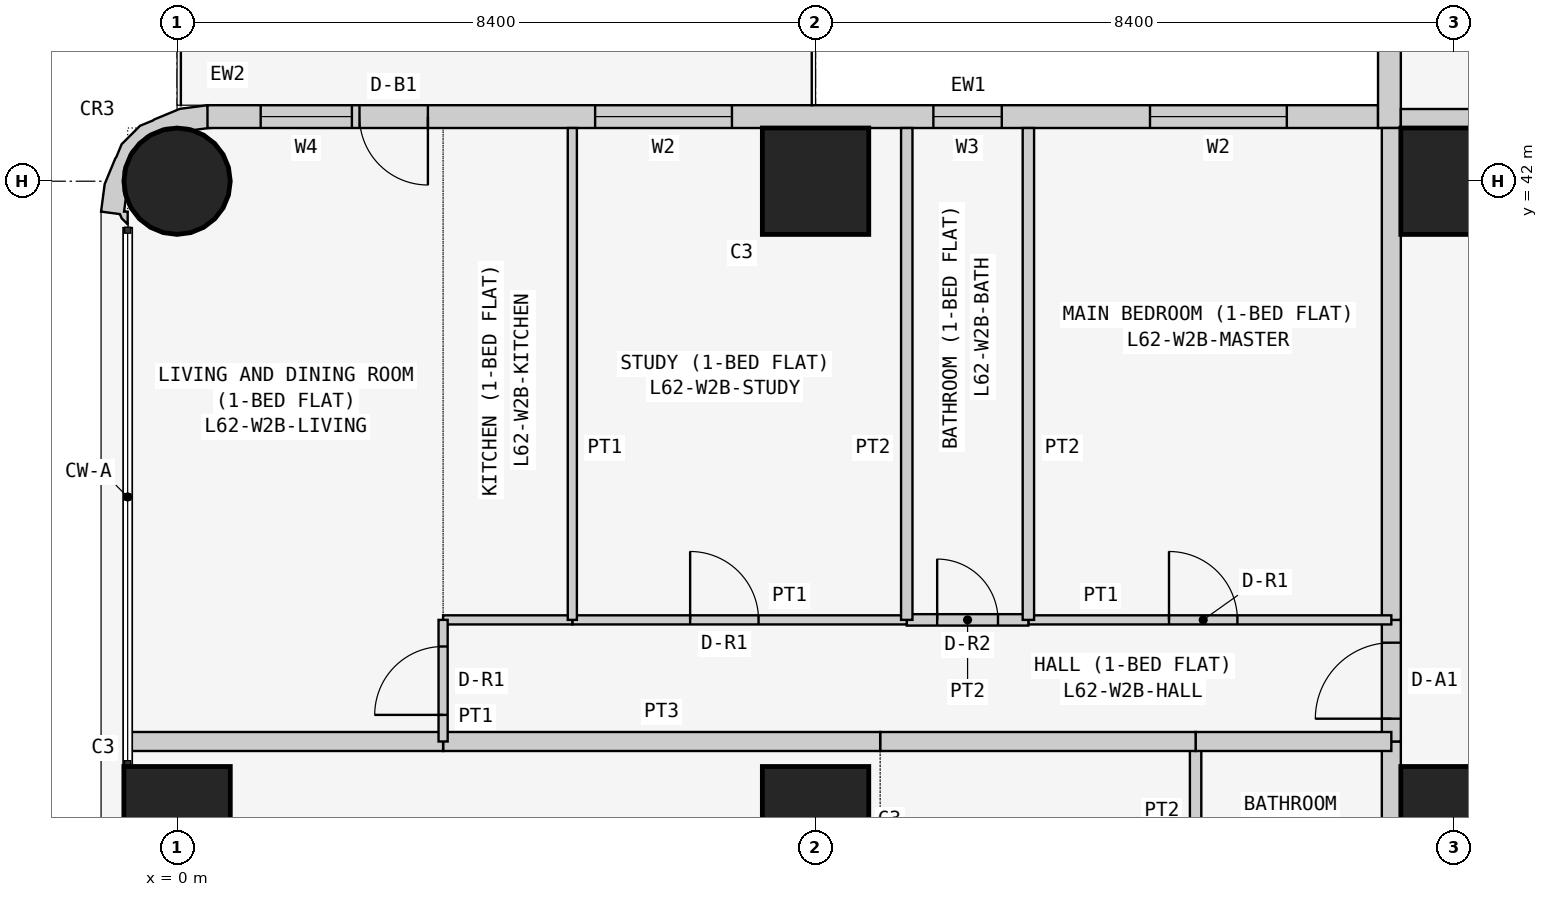
"""IFC4 building model, lengths in metres.
Left out: names, types, materials, properties, quantities, classifications, styles, units other than length and angle.
Written with IfcOpenShell. Run it as: python <this file> out.ifc"""

import sys

from ifc_helpers import new_model, si_unit, direction, frame, frame_2d, origin, origin_2d, place, context, subcontext, project, spatial, polyline, rectangle, circle, outline, extrude, element, fill, save


model = new_model("IFC4")
c1 = context("Model", 3, precision=1e-05, world=origin(), true_north=direction((0.0, 1.0)))
c2 = subcontext(c1, "Body", "Model", "MODEL_VIEW")
j1 = project(units=[si_unit("LENGTHUNIT", "METRE"), si_unit("PLANEANGLEUNIT", "RADIAN")], contexts=[c1])
p1 = place(None, origin())
s1 = spatial("IfcSite", under=j1, at=p1, CompositionType="ELEMENT")
p2 = place(p1, origin())
s2 = spatial("IfcBuilding", under=s1, at=p2, CompositionType="ELEMENT")
p3 = place(p2, frame((0.0, 0.0, 237.3)))
s3 = spatial("IfcBuildingStorey", under=s2, at=p3, CompositionType="ELEMENT", Elevation=237.3)
p4 = place(p3, frame((0.0, 33.6, 0.0), z_axis=(0.0, 0.0, 1.0), x_axis=(1.0, 0.0, 0.0)))
e1 = element("IfcColumn", 1, at=p4, inside=s3, PredefinedType="COLUMN", context=c2, shape_type="SweptSolid", body=[
    extrude(rectangle(XDim=1.4, YDim=1.4, at=origin_2d()), origin(), (0.0, 0.0, 1.0), 3.6),
])
p5 = place(p3, frame((0.0, 42.0, 0.0), z_axis=(0.0, 0.0, 1.0), x_axis=(1.0, 0.0, 0.0)))
e2 = element("IfcColumn", 2, at=p5, inside=s3, PredefinedType="COLUMN", context=c2, shape_type="SweptSolid", body=[
    extrude(circle(Radius=0.7, at=origin_2d()), origin(), (0.0, 0.0, 1.0), 3.6),
])
for number, where, z_axis, x_axis in (
    (3, (8.4, 33.6, 0.0), (0.0, 0.0, 1.0), (1.0, 0.0, 0.0)),
    (4, (8.4, 42.0, 0.0), (0.0, 0.0, 1.0), (1.0, 0.0, 0.0)),
    (5, (16.8, 33.6, 0.0), (0.0, 0.0, 1.0), (1.0, 0.0, 0.0)),
    (6, (16.8, 42.0, 0.0), (0.0, 0.0, 1.0), (1.0, 0.0, 0.0)),
):
    element("IfcColumn", number, at=place(p3, frame(where, z_axis=z_axis, x_axis=x_axis)), inside=s3, PredefinedType="COLUMN", context=c2, shape_type="SweptSolid", body=[
        extrude(rectangle(XDim=1.4, YDim=1.4, at=origin_2d()), origin(), (0.0, 0.0, 1.0), 3.6),
    ])
p6 = place(p3, frame((15.8, 42.85, 0.0), z_axis=(0.0, 0.0, 1.0), x_axis=(-1.0, 0.0, 0.0)))
e7 = element("IfcWall", 7, at=p6, inside=s3, PredefinedType="SOLIDWALL", context=c2, shape_type="SweptSolid", body=[
    extrude(rectangle(XDim=15.4, YDim=0.3, at=frame_2d((7.7, 0.0))), origin(), (0.0, 0.0, 1.0), 3.45),
])
p7 = place(p6, frame((1.2, 0.0, 0.9)))
e8 = element("IfcOpeningElement", 8, at=p7, cuts=e7, PredefinedType="OPENING", context=c2, shape_type="SweptSolid", body=[
    extrude(rectangle(XDim=1.8, YDim=1.5, at=frame_2d((0.9, 0.75))), frame((0.0, 0.16, 0.0), z_axis=(0.0, -1.0, 0.0), x_axis=(1.0, 0.0, 0.0)), (0.0, 0.0, 1.0), 0.32),
])
p8 = place(p6, frame((4.95, 0.0, 1.5)))
e9 = element("IfcOpeningElement", 9, at=p8, cuts=e7, PredefinedType="OPENING", context=c2, shape_type="SweptSolid", body=[
    extrude(rectangle(XDim=0.9, YDim=0.7, at=frame_2d((0.45, 0.35))), frame((0.0, 0.16, 0.0), z_axis=(0.0, -1.0, 0.0), x_axis=(1.0, 0.0, 0.0)), (0.0, 0.0, 1.0), 0.32),
])
p9 = place(p6, frame((8.5, 0.0, 0.9)))
e10 = element("IfcOpeningElement", 10, at=p9, cuts=e7, PredefinedType="OPENING", context=c2, shape_type="SweptSolid", body=[
    extrude(rectangle(XDim=1.8, YDim=1.5, at=frame_2d((0.9, 0.75))), frame((0.0, 0.16, 0.0), z_axis=(0.0, -1.0, 0.0), x_axis=(1.0, 0.0, 0.0)), (0.0, 0.0, 1.0), 0.32),
])
p10 = place(p6, frame((12.5, 0.0, 0.0)))
e11 = element("IfcOpeningElement", 11, at=p10, cuts=e7, PredefinedType="OPENING", context=c2, shape_type="SweptSolid", body=[
    extrude(rectangle(XDim=0.9, YDim=2.4, at=frame_2d((0.45, 1.2))), frame((0.0, 0.16, 0.0), z_axis=(0.0, -1.0, 0.0), x_axis=(1.0, 0.0, 0.0)), (0.0, 0.0, 1.0), 0.32),
])
p11 = place(p6, frame((13.5, 0.0, 0.9)))
e12 = element("IfcOpeningElement", 12, at=p11, cuts=e7, PredefinedType="OPENING", context=c2, shape_type="SweptSolid", body=[
    extrude(rectangle(XDim=1.2, YDim=1.5, at=frame_2d((0.6, 0.75))), frame((0.0, 0.16, 0.0), z_axis=(0.0, -1.0, 0.0), x_axis=(1.0, 0.0, 0.0)), (0.0, 0.0, 1.0), 0.32),
])
p12 = place(p3, frame((15.95, 50.0, 0.0), z_axis=(0.0, 0.0, 1.0), x_axis=(0.0, -1.0, 0.0)))
e13 = element("IfcWall", 13, at=p12, inside=s3, PredefinedType="SOLIDWALL", context=c2, shape_type="SweptSolid", body=[
    extrude(rectangle(XDim=7.3, YDim=0.3, at=frame_2d((3.65, 0.0))), origin(), (0.0, 0.0, 1.0), 3.45),
])
p13 = place(p12, frame((3.1, 0.0, 0.9)))
e14 = element("IfcOpeningElement", 14, at=p13, cuts=e13, PredefinedType="OPENING", context=c2, shape_type="SweptSolid", body=[
    extrude(rectangle(XDim=2.4, YDim=1.5, at=frame_2d((1.2, 0.75))), frame((0.0, 0.16, 0.0), z_axis=(0.0, -1.0, 0.0), x_axis=(1.0, 0.0, 0.0)), (0.0, 0.0, 1.0), 0.32),
])
p14 = place(p12, frame((0.75, 0.0, 0.9)))
e15 = element("IfcOpeningElement", 15, at=p14, cuts=e13, PredefinedType="OPENING", context=c2, shape_type="SweptSolid", body=[
    extrude(rectangle(XDim=1.2, YDim=1.5, at=frame_2d((0.6, 0.75))), frame((0.0, 0.16, 0.0), z_axis=(0.0, -1.0, 0.0), x_axis=(1.0, 0.0, 0.0)), (0.0, 0.0, 1.0), 0.32),
])
p15 = place(p3, frame((0.29, 42.724, 0.0), z_axis=(0.0, 0.0, 1.0), x_axis=(-0.898030234854, 0.439933741929, 0.0)))
e16 = element("IfcWall", 16, at=p15, inside=s3, PredefinedType="SOLIDWALL", context=c2, shape_type="SweptSolid", body=[
    extrude(outline(polyline([(-0.145, -0.044), (0.022, -0.296), (0.327, -0.094), (0.568, 0.18), (0.578, 0.199), (0.7, 0.338), (0.811, 0.661), (0.799, 0.846), (0.803, 0.866), (0.78, 1.231), (0.664, 1.577), (0.426, 1.497), (0.382, 1.536), (0.276, 1.572), (0.349, 1.423), (0.392, 1.444), (0.453, 1.261), (0.51, 1.211), (0.632, 0.961), (0.65, 0.683), (0.56, 0.419), (0.375, 0.21), (0.125, 0.087), (0.05, 0.082), (-0.127, -0.035), (-0.145, -0.044)])), origin(), (0.0, 0.0, 1.0), 3.45),
])
p16 = place(p3, frame((16.1, 42.825, 0.0), z_axis=(0.0, 0.0, 1.0), x_axis=(1.0, 0.0, 0.0)))
e17 = element("IfcWall", 17, at=p16, inside=s3, PredefinedType="PARTITIONING", context=c2, shape_type="SweptSolid", body=[
    extrude(rectangle(XDim=6.871, YDim=0.25, at=frame_2d((3.436, 0.0))), origin(), (0.0, 0.0, 1.0), 3.45),
])
p17 = place(p3, frame((15.975, 32.0, 0.0), z_axis=(0.0, 0.0, 1.0), x_axis=(0.0, 1.0, 0.0)))
e18 = element("IfcWall", 18, at=p17, inside=s3, PredefinedType="PARTITIONING", context=c2, shape_type="SweptSolid", body=[
    extrude(rectangle(XDim=2.629, YDim=0.25, at=frame_2d((1.314, 0.0))), origin(), (0.0, 0.0, 1.0), 3.45),
])
p18 = place(p3, frame((15.975, 34.629, 0.0), z_axis=(0.0, 0.0, 1.0), x_axis=(0.0, 1.0, 0.0)))
e19 = element("IfcWall", 19, at=p18, inside=s3, PredefinedType="PARTITIONING", context=c2, shape_type="SweptSolid", body=[
    extrude(rectangle(XDim=1.6, YDim=0.25, at=frame_2d((0.8, 0.0))), origin(), (0.0, 0.0, 1.0), 3.45),
])
p19 = place(p18, frame((0.3, 0.0, 0.0)))
e20 = element("IfcOpeningElement", 20, at=p19, cuts=e19, PredefinedType="OPENING", context=c2, shape_type="SweptSolid", body=[
    extrude(rectangle(XDim=1.0, YDim=2.1, at=frame_2d((0.5, 1.05))), frame((0.0, 0.135, 0.0), z_axis=(0.0, -1.0, 0.0), x_axis=(1.0, 0.0, 0.0)), (0.0, 0.0, 1.0), 0.27),
])
p20 = place(p3, frame((15.975, 36.229, 0.0), z_axis=(0.0, 0.0, 1.0), x_axis=(0.0, 1.0, 0.0)))
e21 = element("IfcWall", 21, at=p20, inside=s3, PredefinedType="PARTITIONING", context=c2, shape_type="SweptSolid", body=[
    extrude(rectangle(XDim=6.471, YDim=0.25, at=frame_2d((3.235, 0.0))), origin(), (0.0, 0.0, 1.0), 3.45),
])
p21 = place(p3, frame((13.4, 32.0, 0.0), z_axis=(0.0, 0.0, 1.0), x_axis=(0.0, 1.0, 0.0)))
e22 = element("IfcWall", 22, at=p21, inside=s3, PredefinedType="PARTITIONING", context=c2, shape_type="SweptSolid", body=[
    extrude(rectangle(XDim=2.629, YDim=0.15, at=frame_2d((1.314, 0.0))), origin(), (0.0, 0.0, 1.0), 3.45),
])
p22 = place(p3, frame((13.4, 34.629, 0.0), z_axis=(0.0, 0.0, 1.0), x_axis=(1.0, 0.0, 0.0)))
e23 = element("IfcWall", 23, at=p22, inside=s3, PredefinedType="PARTITIONING", context=c2, shape_type="SweptSolid", body=[
    extrude(rectangle(XDim=2.575, YDim=0.25, at=frame_2d((1.288, 0.0))), origin(), (0.0, 0.0, 1.0), 3.45),
])
p23 = place(p3, frame((9.25, 34.629, 0.0), z_axis=(0.0, 0.0, 1.0), x_axis=(1.0, 0.0, 0.0)))
e24 = element("IfcWall", 24, at=p23, inside=s3, PredefinedType="PARTITIONING", context=c2, shape_type="SweptSolid", body=[
    extrude(rectangle(XDim=4.15, YDim=0.25, at=frame_2d((2.075, 0.0))), origin(), (0.0, 0.0, 1.0), 3.45),
])
p24 = place(p3, frame((3.5, 34.629, 0.0), z_axis=(0.0, 0.0, 1.0), x_axis=(1.0, 0.0, 0.0)))
e25 = element("IfcWall", 25, at=p24, inside=s3, PredefinedType="PARTITIONING", context=c2, shape_type="SweptSolid", body=[
    extrude(rectangle(XDim=5.75, YDim=0.25, at=frame_2d((2.875, 0.0))), origin(), (0.0, 0.0, 1.0), 3.45),
])
p25 = place(p3, frame((-0.65, 34.629, 0.0), z_axis=(0.0, 0.0, 1.0), x_axis=(1.0, 0.0, 0.0)))
e26 = element("IfcWall", 26, at=p25, inside=s3, PredefinedType="PARTITIONING", context=c2, shape_type="SweptSolid", body=[
    extrude(rectangle(XDim=4.15, YDim=0.25, at=frame_2d((2.075, 0.0))), origin(), (0.0, 0.0, 1.0), 3.45),
])
p26 = place(p3, frame((11.2, 36.229, 0.0), z_axis=(0.0, 0.0, 1.0), x_axis=(1.0, 0.0, 0.0)))
e27 = element("IfcWall", 27, at=p26, inside=s3, PredefinedType="PARTITIONING", context=c2, shape_type="SweptSolid", body=[
    extrude(rectangle(XDim=4.775, YDim=0.12, at=frame_2d((2.388, 0.0))), origin(), (0.0, 0.0, 1.0), 3.45),
])
p27 = place(p26, frame((1.85, 0.0, 0.0)))
e28 = element("IfcOpeningElement", 28, at=p27, cuts=e27, PredefinedType="OPENING", context=c2, shape_type="SweptSolid", body=[
    extrude(rectangle(XDim=0.9, YDim=2.1, at=frame_2d((0.45, 1.05))), frame((0.0, 0.07, 0.0), z_axis=(0.0, -1.0, 0.0), x_axis=(1.0, 0.0, 0.0)), (0.0, 0.0, 1.0), 0.14),
])
p28 = place(p3, frame((9.6, 36.229, 0.0), z_axis=(0.0, 0.0, 1.0), x_axis=(1.0, 0.0, 0.0)))
e29 = element("IfcWall", 29, at=p28, inside=s3, PredefinedType="PARTITIONING", context=c2, shape_type="SweptSolid", body=[
    extrude(rectangle(XDim=1.6, YDim=0.15, at=frame_2d((0.8, 0.0))), origin(), (0.0, 0.0, 1.0), 3.45),
])
p29 = place(p28, frame((0.4, 0.0, 0.0)))
e30 = element("IfcOpeningElement", 30, at=p29, cuts=e29, PredefinedType="OPENING", context=c2, shape_type="SweptSolid", body=[
    extrude(rectangle(XDim=0.8, YDim=2.1, at=frame_2d((0.4, 1.05))), frame((0.0, 0.085, 0.0), z_axis=(0.0, -1.0, 0.0), x_axis=(1.0, 0.0, 0.0)), (0.0, 0.0, 1.0), 0.17),
])
p30 = place(p3, frame((5.2, 36.229, 0.0), z_axis=(0.0, 0.0, 1.0), x_axis=(1.0, 0.0, 0.0)))
e31 = element("IfcWall", 31, at=p30, inside=s3, PredefinedType="PARTITIONING", context=c2, shape_type="SweptSolid", body=[
    extrude(rectangle(XDim=4.4, YDim=0.12, at=frame_2d((2.2, 0.0))), origin(), (0.0, 0.0, 1.0), 3.45),
])
p31 = place(p30, frame((1.55, 0.0, 0.0)))
e32 = element("IfcOpeningElement", 32, at=p31, cuts=e31, PredefinedType="OPENING", context=c2, shape_type="SweptSolid", body=[
    extrude(rectangle(XDim=0.9, YDim=2.1, at=frame_2d((0.45, 1.05))), frame((0.0, 0.07, 0.0), z_axis=(0.0, -1.0, 0.0), x_axis=(1.0, 0.0, 0.0)), (0.0, 0.0, 1.0), 0.14),
])
p32 = place(p3, frame((3.5, 36.229, 0.0), z_axis=(0.0, 0.0, 1.0), x_axis=(1.0, 0.0, 0.0)))
e33 = element("IfcWall", 33, at=p32, inside=s3, PredefinedType="PARTITIONING", context=c2, shape_type="SweptSolid", body=[
    extrude(rectangle(XDim=1.7, YDim=0.12, at=frame_2d((0.85, 0.0))), origin(), (0.0, 0.0, 1.0), 3.45),
])
p33 = place(p3, frame((3.5, 34.629, 0.0), z_axis=(0.0, 0.0, 1.0), x_axis=(0.0, 1.0, 0.0)))
e34 = element("IfcWall", 34, at=p33, inside=s3, PredefinedType="PARTITIONING", context=c2, shape_type="SweptSolid", body=[
    extrude(rectangle(XDim=1.6, YDim=0.12, at=frame_2d((0.8, 0.0))), origin(), (0.0, 0.0, 1.0), 3.45),
])
p34 = place(p33, frame((0.35, 0.0, 0.0)))
e35 = element("IfcOpeningElement", 35, at=p34, cuts=e34, PredefinedType="OPENING", context=c2, shape_type="SweptSolid", body=[
    extrude(rectangle(XDim=0.9, YDim=2.1, at=frame_2d((0.45, 1.05))), frame((0.0, 0.07, 0.0), z_axis=(0.0, -1.0, 0.0), x_axis=(1.0, 0.0, 0.0)), (0.0, 0.0, 1.0), 0.14),
])
for number, where, z_axis, x_axis in (
    (36, (11.2, 36.229, 0.0), (0.0, 0.0, 1.0), (0.0, 1.0, 0.0)),
    (37, (9.6, 36.229, 0.0), (0.0, 0.0, 1.0), (0.0, 1.0, 0.0)),
):
    element("IfcWall", number, at=place(p3, frame(where, z_axis=z_axis, x_axis=x_axis)), inside=s3, PredefinedType="PARTITIONING", context=c2, shape_type="SweptSolid", body=[
        extrude(rectangle(XDim=6.471, YDim=0.15, at=frame_2d((3.235, 0.0))), origin(), (0.0, 0.0, 1.0), 3.45),
    ])
p35 = place(p3, frame((5.2, 36.229, 0.0), z_axis=(0.0, 0.0, 1.0), x_axis=(0.0, 1.0, 0.0)))
e38 = element("IfcWall", 38, at=p35, inside=s3, PredefinedType="PARTITIONING", context=c2, shape_type="SweptSolid", body=[
    extrude(rectangle(XDim=6.471, YDim=0.12, at=frame_2d((3.235, 0.0))), origin(), (0.0, 0.0, 1.0), 3.45),
])
p36 = place(p7, origin())
e39 = element("IfcWindow", 39, at=p36, inside=s3, PartitioningType="SINGLE_PANEL", PredefinedType="WINDOW", context=c2, shape_type="SweptSolid", body=[
    extrude(rectangle(XDim=1.8, YDim=1.5, at=frame_2d((0.9, 0.75))), frame((0.0, 0.03, 0.0), z_axis=(0.0, -1.0, 0.0), x_axis=(1.0, 0.0, 0.0)), (0.0, 0.0, 1.0), 0.06),
])
fill(e8, e39)
p37 = place(p8, origin())
e40 = element("IfcWindow", 40, at=p37, inside=s3, PartitioningType="SINGLE_PANEL", PredefinedType="WINDOW", context=c2, shape_type="SweptSolid", body=[
    extrude(rectangle(XDim=0.9, YDim=0.7, at=frame_2d((0.45, 0.35))), frame((0.0, 0.03, 0.0), z_axis=(0.0, -1.0, 0.0), x_axis=(1.0, 0.0, 0.0)), (0.0, 0.0, 1.0), 0.06),
])
fill(e9, e40)
p38 = place(p9, origin())
e41 = element("IfcWindow", 41, at=p38, inside=s3, PartitioningType="SINGLE_PANEL", PredefinedType="WINDOW", context=c2, shape_type="SweptSolid", body=[
    extrude(rectangle(XDim=1.8, YDim=1.5, at=frame_2d((0.9, 0.75))), frame((0.0, 0.03, 0.0), z_axis=(0.0, -1.0, 0.0), x_axis=(1.0, 0.0, 0.0)), (0.0, 0.0, 1.0), 0.06),
])
fill(e10, e41)
p39 = place(p10, origin())
e42 = element("IfcDoor", 42, at=p39, inside=s3, OperationType="SINGLE_SWING_LEFT", PredefinedType="DOOR", context=c2, shape_type="SweptSolid", body=[
    extrude(rectangle(XDim=0.9, YDim=2.4, at=frame_2d((0.45, 1.2))), frame((0.0, 0.025, 0.0), z_axis=(0.0, -1.0, 0.0), x_axis=(1.0, 0.0, 0.0)), (0.0, 0.0, 1.0), 0.05),
])
fill(e11, e42)
p40 = place(p11, origin())
e43 = element("IfcWindow", 43, at=p40, inside=s3, PartitioningType="SINGLE_PANEL", PredefinedType="WINDOW", context=c2, shape_type="SweptSolid", body=[
    extrude(rectangle(XDim=1.2, YDim=1.5, at=frame_2d((0.6, 0.75))), frame((0.0, 0.03, 0.0), z_axis=(0.0, -1.0, 0.0), x_axis=(1.0, 0.0, 0.0)), (0.0, 0.0, 1.0), 0.06),
])
fill(e12, e43)
p41 = place(p19, origin())
e44 = element("IfcDoor", 44, at=p41, inside=s3, OperationType="SINGLE_SWING_LEFT", PredefinedType="DOOR", context=c2, shape_type="SweptSolid", body=[
    extrude(rectangle(XDim=1.0, YDim=2.1, at=frame_2d((0.5, 1.05))), frame((0.0, 0.025, 0.0), z_axis=(0.0, -1.0, 0.0), x_axis=(1.0, 0.0, 0.0)), (0.0, 0.0, 1.0), 0.05),
])
fill(e20, e44)
p42 = place(p27, origin())
e45 = element("IfcDoor", 45, at=p42, inside=s3, OperationType="SINGLE_SWING_LEFT", PredefinedType="DOOR", context=c2, shape_type="SweptSolid", body=[
    extrude(rectangle(XDim=0.9, YDim=2.1, at=frame_2d((0.45, 1.05))), frame((0.0, 0.025, 0.0), z_axis=(0.0, -1.0, 0.0), x_axis=(1.0, 0.0, 0.0)), (0.0, 0.0, 1.0), 0.05),
])
fill(e28, e45)
p43 = place(p29, origin())
e46 = element("IfcDoor", 46, at=p43, inside=s3, OperationType="SINGLE_SWING_LEFT", PredefinedType="DOOR", context=c2, shape_type="SweptSolid", body=[
    extrude(rectangle(XDim=0.8, YDim=2.1, at=frame_2d((0.4, 1.05))), frame((0.0, 0.025, 0.0), z_axis=(0.0, -1.0, 0.0), x_axis=(1.0, 0.0, 0.0)), (0.0, 0.0, 1.0), 0.05),
])
fill(e30, e46)
p44 = place(p31, origin())
e47 = element("IfcDoor", 47, at=p44, inside=s3, OperationType="SINGLE_SWING_LEFT", PredefinedType="DOOR", context=c2, shape_type="SweptSolid", body=[
    extrude(rectangle(XDim=0.9, YDim=2.1, at=frame_2d((0.45, 1.05))), frame((0.0, 0.025, 0.0), z_axis=(0.0, -1.0, 0.0), x_axis=(1.0, 0.0, 0.0)), (0.0, 0.0, 1.0), 0.05),
])
fill(e32, e47)
p45 = place(p34, origin())
e48 = element("IfcDoor", 48, at=p45, inside=s3, OperationType="SINGLE_SWING_LEFT", PredefinedType="DOOR", context=c2, shape_type="SweptSolid", body=[
    extrude(rectangle(XDim=0.9, YDim=2.1, at=frame_2d((0.45, 1.05))), frame((0.0, 0.025, 0.0), z_axis=(0.0, -1.0, 0.0), x_axis=(1.0, 0.0, 0.0)), (0.0, 0.0, 1.0), 0.05),
])
fill(e35, e48)
save(model, sys.argv[1])
